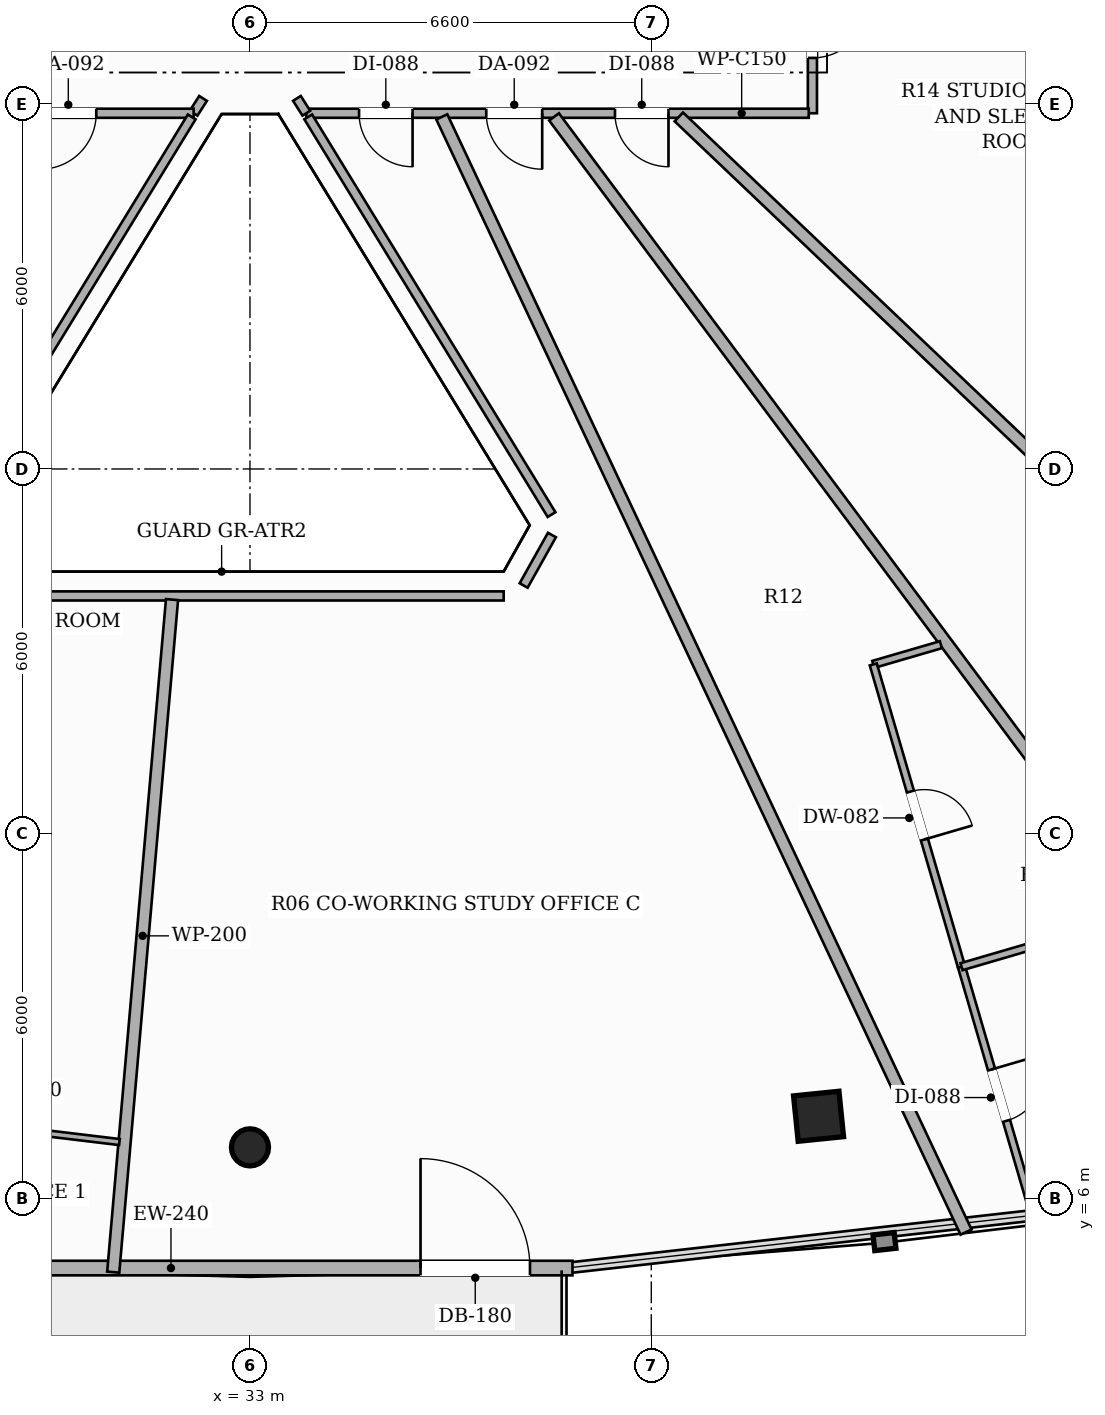
"""IFC4 building model, lengths in metres.
Left out: names, types, materials, properties, quantities, classifications, styles, units other than length and angle.
Written with IfcOpenShell. Run it as: python <this file> out.ifc"""

import sys

from ifc_helpers import new_model, si_unit, direction, frame, frame_2d, origin, origin_2d, place, context, subcontext, project, spatial, rectangle, hollow_rectangle, hollow_circle, extrude, element, fill, save


model = new_model("IFC4")
c1 = context("Model", 3, precision=1e-05, world=origin(), true_north=direction((0.0, 1.0)))
c2 = subcontext(c1, "Body", "Model", "MODEL_VIEW")
j1 = project(units=[si_unit("LENGTHUNIT", "METRE"), si_unit("PLANEANGLEUNIT", "RADIAN")], contexts=[c1])
p1 = place(None, origin())
s1 = spatial("IfcSite", under=j1, at=p1, CompositionType="ELEMENT")
p2 = place(p1, origin())
s2 = spatial("IfcBuilding", under=s1, at=p2, CompositionType="ELEMENT")
p3 = place(p2, frame((0.0, 0.0, 219.5)))
s3 = spatial("IfcBuildingStorey", under=s2, at=p3, CompositionType="ELEMENT", Elevation=219.5)
p4 = place(p3, frame((33.0, 6.844, 0.0), z_axis=(0.0, 0.0, 1.0), x_axis=(1.0, 0.0, 0.0)))
e1 = element("IfcColumn", 1, at=p4, inside=s3, PredefinedType="COLUMN", context=c2, shape_type="SweptSolid", body=[
    extrude(hollow_circle(Radius=0.305, WallThickness=0.016, at=origin_2d()), origin(), (0.0, 0.0, 1.0), 3.3),
])
p5 = place(p3, frame((42.351, 7.355, 0.0), z_axis=(0.0, 0.0, 1.0), x_axis=(0.994880708829, 0.101056297183, 0.0)))
e2 = element("IfcColumn", 2, at=p5, inside=s3, PredefinedType="COLUMN", context=c2, shape_type="SweptSolid", body=[
    extrude(hollow_rectangle(XDim=0.75, YDim=0.75, WallThickness=0.025, at=origin_2d()), origin(), (0.0, 0.0, 1.0), 3.3),
])
p6 = place(p3, frame((27.696, 4.859, 0.0), z_axis=(0.0, 0.0, 1.0), x_axis=(1.0, 0.0, 0.0)))
e3 = element("IfcWall", 3, at=p6, inside=s3, PredefinedType="SOLIDWALL", context=c2, shape_type="SweptSolid", body=[
    extrude(rectangle(XDim=10.608, YDim=0.24, at=frame_2d((5.304, 0.0))), origin(), (0.0, 0.0, 1.0), 2.624),
])
p7 = place(p6, frame((8.109, 0.0, 0.0)))
e4 = element("IfcOpeningElement", 4, at=p7, cuts=e3, PredefinedType="OPENING", context=c2, shape_type="SweptSolid", body=[
    extrude(rectangle(XDim=1.8, YDim=2.2, at=frame_2d((0.9, 1.1))), frame((0.0, 0.13, 0.0), z_axis=(0.0, -1.0, 0.0), x_axis=(1.0, 0.0, 0.0)), (0.0, 0.0, 1.0), 0.26),
])
p8 = place(p3, frame((32.228, 24.094, 0.0), z_axis=(0.0, 0.0, 1.0), x_axis=(-0.53643811989, -0.843939656331, 0.0)))
e5 = element("IfcWall", 5, at=p8, inside=s3, PredefinedType="PARTITIONING", context=c2, shape_type="SweptSolid", body=[
    extrude(rectangle(XDim=0.289, YDim=0.15, at=frame_2d((0.145, 0.0))), origin(), (0.0, 0.0, 1.0), 3.06),
])
p9 = place(p3, frame((32.073, 23.85, 0.0), z_axis=(0.0, 0.0, 1.0), x_axis=(-1.0, 0.0, 0.0)))
e6 = element("IfcWall", 6, at=p9, inside=s3, PredefinedType="PARTITIONING", context=c2, shape_type="SweptSolid", body=[
    extrude(rectangle(XDim=8.423, YDim=0.15, at=frame_2d((4.211, 0.0))), origin(), (0.0, 0.0, 1.0), 2.565),
])
p10 = place(p9, frame((1.601, 0.0, 0.0)))
e7 = element("IfcOpeningElement", 7, at=p10, cuts=e6, PredefinedType="OPENING", context=c2, shape_type="SweptSolid", body=[
    extrude(rectangle(XDim=0.92, YDim=2.15, at=frame_2d((0.46, 1.075))), frame((0.0, 0.085, 0.0), z_axis=(0.0, -1.0, 0.0), x_axis=(1.0, 0.0, 0.0)), (0.0, 0.0, 1.0), 0.17),
])
p11 = place(p9, frame((4.841, 0.0, 0.0)))
e8 = element("IfcOpeningElement", 8, at=p11, cuts=e6, PredefinedType="OPENING", context=c2, shape_type="SweptSolid", body=[
    extrude(rectangle(XDim=0.88, YDim=2.1, at=frame_2d((0.44, 1.05))), frame((0.0, 0.085, 0.0), z_axis=(0.0, -1.0, 0.0), x_axis=(1.0, 0.0, 0.0)), (0.0, 0.0, 1.0), 0.17),
])
p12 = place(p3, frame((42.25, 26.59, 0.0), z_axis=(0.0, 0.0, 1.0), x_axis=(0.0, -1.0, 0.0)))
e9 = element("IfcWall", 9, at=p12, inside=s3, PredefinedType="PARTITIONING", context=c2, shape_type="SweptSolid", body=[
    extrude(rectangle(XDim=2.74, YDim=0.15, at=frame_2d((1.37, 0.0))), origin(), (0.0, 0.0, 1.0), 2.773),
])
p13 = place(p12, frame((0.91, 0.0, 0.0)))
e10 = element("IfcOpeningElement", 10, at=p13, cuts=e9, PredefinedType="OPENING", context=c2, shape_type="SweptSolid", body=[
    extrude(rectangle(XDim=0.92, YDim=2.15, at=frame_2d((0.46, 1.075))), frame((0.0, 0.085, 0.0), z_axis=(0.0, -1.0, 0.0), x_axis=(1.0, 0.0, 0.0)), (0.0, 0.0, 1.0), 0.17),
])
p14 = place(p3, frame((42.19, 23.85, 0.0), z_axis=(0.0, 0.0, 1.0), x_axis=(-1.0, 0.0, 0.0)))
e11 = element("IfcWall", 11, at=p14, inside=s3, PredefinedType="PARTITIONING", context=c2, shape_type="SweptSolid", body=[
    extrude(rectangle(XDim=8.263, YDim=0.15, at=frame_2d((4.131, 0.0))), origin(), (0.0, 0.0, 1.0), 2.565),
])
p15 = place(p14, frame((6.516, 0.0, 0.0)))
e12 = element("IfcOpeningElement", 12, at=p15, cuts=e11, PredefinedType="OPENING", context=c2, shape_type="SweptSolid", body=[
    extrude(rectangle(XDim=0.88, YDim=2.1, at=frame_2d((0.44, 1.05))), frame((0.0, 0.085, 0.0), z_axis=(0.0, -1.0, 0.0), x_axis=(1.0, 0.0, 0.0)), (0.0, 0.0, 1.0), 0.17),
])
p16 = place(p14, frame((2.307, 0.0, 0.0)))
e13 = element("IfcOpeningElement", 13, at=p16, cuts=e11, PredefinedType="OPENING", context=c2, shape_type="SweptSolid", body=[
    extrude(rectangle(XDim=0.88, YDim=2.1, at=frame_2d((0.44, 1.05))), frame((0.0, 0.085, 0.0), z_axis=(0.0, -1.0, 0.0), x_axis=(1.0, 0.0, 0.0)), (0.0, 0.0, 1.0), 0.17),
])
p17 = place(p14, frame((4.384, 0.0, 0.0)))
e14 = element("IfcOpeningElement", 14, at=p17, cuts=e11, PredefinedType="OPENING", context=c2, shape_type="SweptSolid", body=[
    extrude(rectangle(XDim=0.92, YDim=2.15, at=frame_2d((0.46, 1.075))), frame((0.0, 0.085, 0.0), z_axis=(0.0, -1.0, 0.0), x_axis=(1.0, 0.0, 0.0)), (0.0, 0.0, 1.0), 0.17),
])
p18 = place(p3, frame((33.927, 23.851, 0.0), z_axis=(0.0, 0.0, 1.0), x_axis=(-0.537971414128, 0.84296308198, 0.0)))
e15 = element("IfcWall", 15, at=p18, inside=s3, PredefinedType="PARTITIONING", context=c2, shape_type="SweptSolid", body=[
    extrude(rectangle(XDim=0.288, YDim=0.15, at=frame_2d((0.144, 0.0))), origin(), (0.0, 0.0, 1.0), 3.06),
])
p19 = place(p3, frame((33.958, 23.79, 0.0), z_axis=(0.0, 0.0, 1.0), x_axis=(0.521949656317, -0.852976292912, 0.0)))
e16 = element("IfcWall", 16, at=p19, inside=s3, PredefinedType="PARTITIONING", context=c2, shape_type="SweptSolid", body=[
    extrude(rectangle(XDim=7.667, YDim=0.15, at=frame_2d((3.833, 0.0))), origin(), (0.0, 0.0, 1.0), 2.773),
])
p20 = place(p3, frame((37.966, 16.914, 0.0), z_axis=(0.0, 0.0, 1.0), x_axis=(-0.48879868802, -0.872396608539, 0.0)))
e17 = element("IfcWall", 17, at=p20, inside=s3, PredefinedType="PARTITIONING", context=c2, shape_type="SweptSolid", body=[
    extrude(rectangle(XDim=0.951, YDim=0.15, at=frame_2d((0.476, 0.0))), origin(), (0.0, 0.0, 1.0), 3.06),
])
p21 = place(p3, frame((37.172, 15.912, 0.0), z_axis=(0.0, 0.0, 1.0), x_axis=(-1.0, 0.0, 0.0)))
e18 = element("IfcWall", 18, at=p21, inside=s3, PredefinedType="PARTITIONING", context=c2, shape_type="SweptSolid", body=[
    extrude(rectangle(XDim=8.344, YDim=0.15, at=frame_2d((4.172, 0.0))), origin(), (0.0, 0.0, 1.0), 2.773),
])
p22 = place(p3, frame((28.04, 17.25, 0.0), z_axis=(0.0, 0.0, 1.0), x_axis=(0.521949656317, 0.852976292912, 0.0)))
e19 = element("IfcWall", 19, at=p22, inside=s3, PredefinedType="PARTITIONING", context=c2, shape_type="SweptSolid", body=[
    extrude(rectangle(XDim=7.667, YDim=0.15, at=frame_2d((3.833, 0.0))), origin(), (0.0, 0.0, 1.0), 2.773),
])
p23 = place(p3, frame((31.718, 15.852, 0.0), z_axis=(0.0, 0.0, 1.0), x_axis=(-0.087103117533, -0.996199300801, 0.0)))
e20 = element("IfcWall", 20, at=p23, inside=s3, PredefinedType="PARTITIONING", context=c2, shape_type="SweptSolid", body=[
    extrude(rectangle(XDim=11.102, YDim=0.2, at=frame_2d((5.551, 0.0))), origin(), (0.0, 0.0, 1.0), 2.492),
])
p24 = place(p3, frame((56.059, 8.563, 0.0), z_axis=(0.0, 0.0, 1.0), x_axis=(-0.724518891706, 0.689254942355, 0.0)))
e21 = element("IfcWall", 21, at=p24, inside=s3, PredefinedType="PARTITIONING", context=c2, shape_type="SweptSolid", body=[
    extrude(rectangle(XDim=22.092, YDim=0.2, at=frame_2d((11.046, 0.0))), origin(), (0.0, 0.0, 1.0), 2.492),
])
p25 = place(p3, frame((36.155, 23.79, 0.0), z_axis=(0.0, 0.0, 1.0), x_axis=(0.425451226132, -0.90498135571, 0.0)))
e22 = element("IfcWall", 22, at=p25, inside=s3, PredefinedType="PARTITIONING", context=c2, shape_type="SweptSolid", body=[
    extrude(rectangle(XDim=20.266, YDim=0.2, at=frame_2d((10.133, 0.0))), origin(), (0.0, 0.0, 1.0), 2.492),
])
p26 = place(p3, frame((51.072, 6.251, 0.0), z_axis=(0.0, 0.0, 1.0), x_axis=(-0.59756139073, 0.801823162742, 0.0)))
e23 = element("IfcWall", 23, at=p26, inside=s3, PredefinedType="PARTITIONING", context=c2, shape_type="SweptSolid", body=[
    extrude(rectangle(XDim=21.874, YDim=0.2, at=frame_2d((10.937, 0.0))), origin(), (0.0, 0.0, 1.0), 2.492),
])
p27 = place(p3, frame((30.853, 6.931, 0.0), z_axis=(0.0, 0.0, 1.0), x_axis=(-0.992840033501, 0.119451529409, 0.0)))
e24 = element("IfcWall", 24, at=p27, inside=s3, PredefinedType="PARTITIONING", context=c2, shape_type="SweptSolid", body=[
    extrude(rectangle(XDim=7.417, YDim=0.1, at=frame_2d((3.708, 0.0))), origin(), (0.0, 0.0, 1.0), 2.492),
])
p28 = place(p27, frame((3.269, 0.0, 0.0)))
e25 = element("IfcOpeningElement", 25, at=p28, cuts=e24, PredefinedType="OPENING", context=c2, shape_type="SweptSolid", body=[
    extrude(rectangle(XDim=0.88, YDim=2.1, at=frame_2d((0.44, 1.05))), frame((0.0, 0.06, 0.0), z_axis=(0.0, -1.0, 0.0), x_axis=(1.0, 0.0, 0.0)), (0.0, 0.0, 1.0), 0.12),
])
p29 = place(p3, frame((44.363, 15.11, 0.0), z_axis=(0.0, 0.0, 1.0), x_axis=(-0.960030681494, -0.279894784857, 0.0)))
e26 = element("IfcWall", 26, at=p29, inside=s3, PredefinedType="PARTITIONING", context=c2, shape_type="SweptSolid", body=[
    extrude(rectangle(XDim=1.158, YDim=0.12, at=frame_2d((0.579, 0.0))), origin(), (0.0, 0.0, 1.0), 2.773),
])
p30 = place(p3, frame((43.251, 14.786, 0.0), z_axis=(0.0, 0.0, 1.0), x_axis=(0.280190088139, -0.959944537204, 0.0)))
e27 = element("IfcWall", 27, at=p30, inside=s3, PredefinedType="PARTITIONING", context=c2, shape_type="SweptSolid", body=[
    extrude(rectangle(XDim=5.178, YDim=0.12, at=frame_2d((2.589, 0.0))), origin(), (0.0, 0.0, 1.0), 3.06),
])
p31 = place(p30, frame((2.179, 0.0, 0.0)))
e28 = element("IfcOpeningElement", 28, at=p31, cuts=e27, PredefinedType="OPENING", context=c2, shape_type="SweptSolid", body=[
    extrude(rectangle(XDim=0.82, YDim=2.1, at=frame_2d((0.41, 1.05))), frame((0.0, 0.07, 0.0), z_axis=(0.0, -1.0, 0.0), x_axis=(1.0, 0.0, 0.0)), (0.0, 0.0, 1.0), 0.14),
])
p32 = place(p3, frame((44.702, 9.815, 0.0), z_axis=(0.0, 0.0, 1.0), x_axis=(0.28033432121, -0.959902426474, 0.0)))
e29 = element("IfcWall", 29, at=p32, inside=s3, PredefinedType="PARTITIONING", context=c2, shape_type="SweptSolid", body=[
    extrude(rectangle(XDim=4.402, YDim=0.12, at=frame_2d((2.201, 0.0))), origin(), (0.0, 0.0, 1.0), 2.492),
])
p33 = place(p32, frame((1.761, 0.0, 0.0)))
e30 = element("IfcOpeningElement", 30, at=p33, cuts=e29, PredefinedType="OPENING", context=c2, shape_type="SweptSolid", body=[
    extrude(rectangle(XDim=0.88, YDim=2.1, at=frame_2d((0.44, 1.05))), frame((0.0, 0.07, 0.0), z_axis=(0.0, -1.0, 0.0), x_axis=(1.0, 0.0, 0.0)), (0.0, 0.0, 1.0), 0.14),
])
p34 = place(p3, frame((47.665, 10.68, 0.0), z_axis=(0.0, 0.0, 1.0), x_axis=(-0.959935309068, -0.280221702235, 0.0)))
e31 = element("IfcWall", 31, at=p34, inside=s3, PredefinedType="PARTITIONING", context=c2, shape_type="SweptSolid", body=[
    extrude(rectangle(XDim=3.087, YDim=0.12, at=frame_2d((1.543, 0.0))), origin(), (0.0, 0.0, 1.0), 2.773),
])
p35 = place(p7, origin())
e32 = element("IfcDoor", 32, at=p35, inside=s3, OperationType="SINGLE_SWING_LEFT", PredefinedType="DOOR", context=c2, shape_type="SweptSolid", body=[
    extrude(rectangle(XDim=1.8, YDim=2.2, at=frame_2d((0.9, 1.1))), frame((0.0, 0.025, 0.0), z_axis=(0.0, -1.0, 0.0), x_axis=(1.0, 0.0, 0.0)), (0.0, 0.0, 1.0), 0.05),
])
fill(e4, e32)
p36 = place(p10, origin())
e33 = element("IfcDoor", 33, at=p36, inside=s3, OperationType="SINGLE_SWING_RIGHT", PredefinedType="DOOR", context=c2, shape_type="SweptSolid", body=[
    extrude(rectangle(XDim=0.92, YDim=2.15, at=frame_2d((0.46, 1.075))), frame((0.0, 0.025, 0.0), z_axis=(0.0, -1.0, 0.0), x_axis=(1.0, 0.0, 0.0)), (0.0, 0.0, 1.0), 0.05),
])
fill(e7, e33)
p37 = place(p13, origin())
e34 = element("IfcDoor", 34, at=p37, inside=s3, OperationType="SINGLE_SWING_LEFT", PredefinedType="DOOR", context=c2, shape_type="SweptSolid", body=[
    extrude(rectangle(XDim=0.92, YDim=2.15, at=frame_2d((0.46, 1.075))), frame((0.0, 0.025, 0.0), z_axis=(0.0, -1.0, 0.0), x_axis=(1.0, 0.0, 0.0)), (0.0, 0.0, 1.0), 0.05),
])
fill(e10, e34)
p38 = place(p15, origin())
e35 = element("IfcDoor", 35, at=p38, inside=s3, OperationType="SINGLE_SWING_LEFT", PredefinedType="DOOR", context=c2, shape_type="SweptSolid", body=[
    extrude(rectangle(XDim=0.88, YDim=2.1, at=frame_2d((0.44, 1.05))), frame((0.0, 0.025, 0.0), z_axis=(0.0, -1.0, 0.0), x_axis=(1.0, 0.0, 0.0)), (0.0, 0.0, 1.0), 0.05),
])
fill(e12, e35)
p39 = place(p16, origin())
e36 = element("IfcDoor", 36, at=p39, inside=s3, OperationType="SINGLE_SWING_LEFT", PredefinedType="DOOR", context=c2, shape_type="SweptSolid", body=[
    extrude(rectangle(XDim=0.88, YDim=2.1, at=frame_2d((0.44, 1.05))), frame((0.0, 0.025, 0.0), z_axis=(0.0, -1.0, 0.0), x_axis=(1.0, 0.0, 0.0)), (0.0, 0.0, 1.0), 0.05),
])
fill(e13, e36)
p40 = place(p17, origin())
e37 = element("IfcDoor", 37, at=p40, inside=s3, OperationType="SINGLE_SWING_LEFT", PredefinedType="DOOR", context=c2, shape_type="SweptSolid", body=[
    extrude(rectangle(XDim=0.92, YDim=2.15, at=frame_2d((0.46, 1.075))), frame((0.0, 0.025, 0.0), z_axis=(0.0, -1.0, 0.0), x_axis=(1.0, 0.0, 0.0)), (0.0, 0.0, 1.0), 0.05),
])
fill(e14, e37)
p41 = place(p31, origin())
e38 = element("IfcDoor", 38, at=p41, inside=s3, OperationType="SINGLE_SWING_RIGHT", PredefinedType="DOOR", context=c2, shape_type="SweptSolid", body=[
    extrude(rectangle(XDim=0.82, YDim=2.1, at=frame_2d((0.41, 1.05))), frame((0.0, 0.025, 0.0), z_axis=(0.0, -1.0, 0.0), x_axis=(1.0, 0.0, 0.0)), (0.0, 0.0, 1.0), 0.05),
])
fill(e28, e38)
p42 = place(p33, origin())
e39 = element("IfcDoor", 39, at=p42, inside=s3, OperationType="SINGLE_SWING_LEFT", PredefinedType="DOOR", context=c2, shape_type="SweptSolid", body=[
    extrude(rectangle(XDim=0.88, YDim=2.1, at=frame_2d((0.44, 1.05))), frame((0.0, 0.025, 0.0), z_axis=(0.0, -1.0, 0.0), x_axis=(1.0, 0.0, 0.0)), (0.0, 0.0, 1.0), 0.05),
])
fill(e30, e39)
save(model, sys.argv[1])
